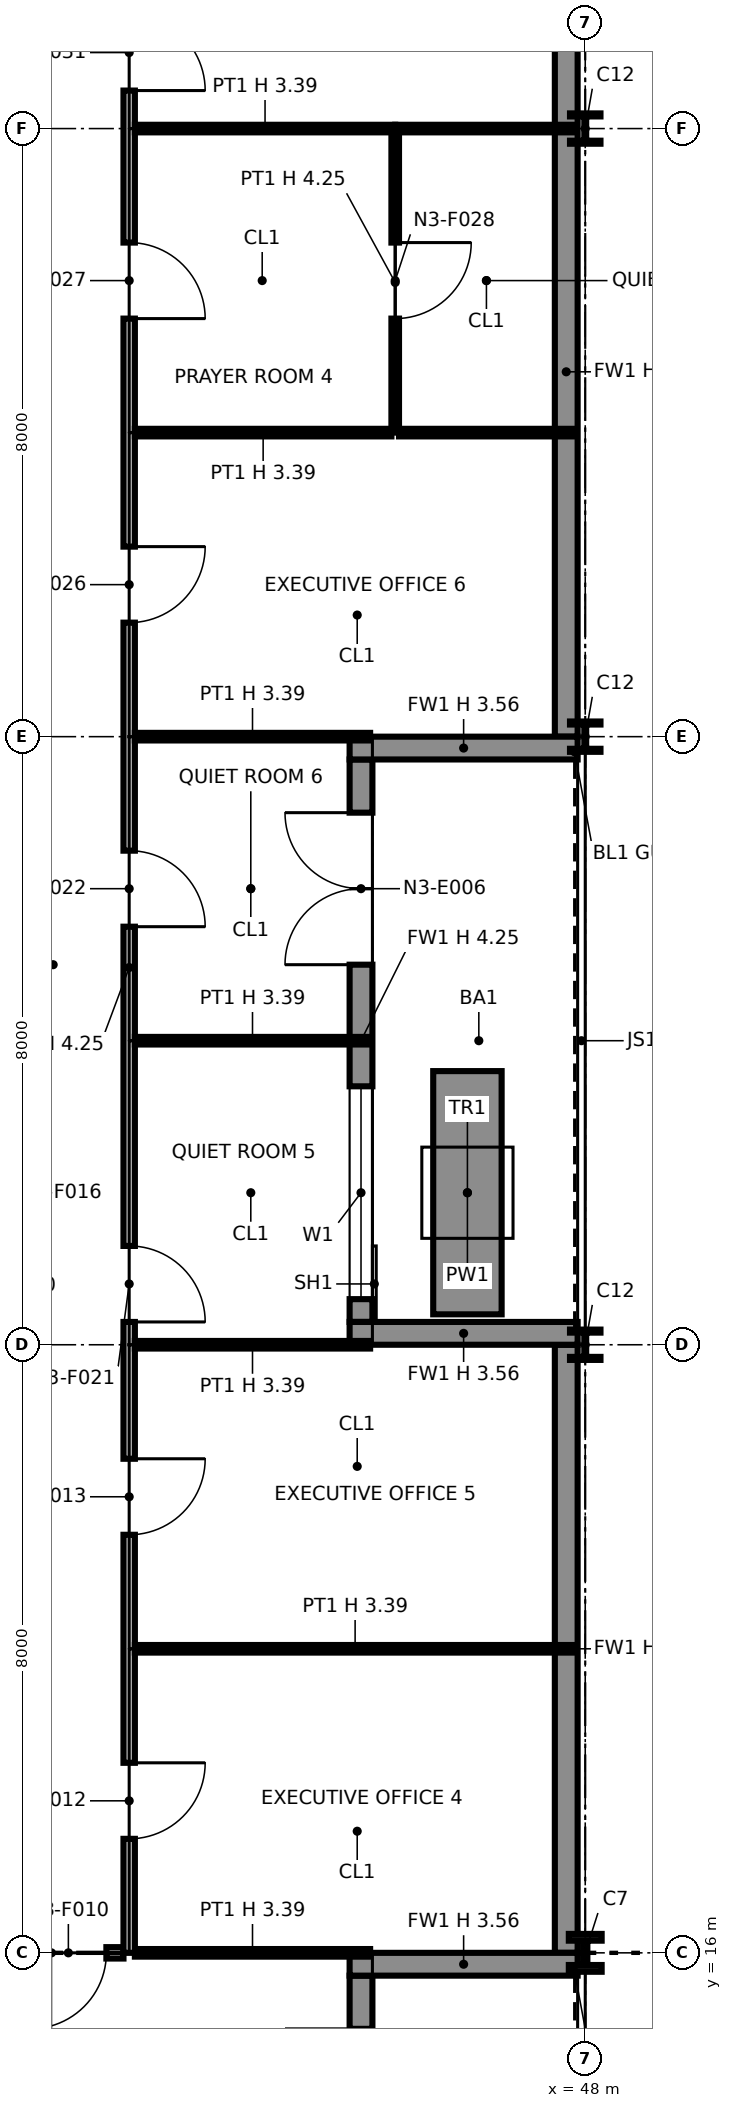
"""IFC4 building model, lengths in metres.
Left out: names, types, materials, properties, quantities, classifications, styles, units other than length and angle.
Written with IfcOpenShell. Run it as: python <this file> out.ifc"""

import sys

from ifc_helpers import new_model, si_unit, direction, frame, frame_2d, origin, origin_2d, place, context, subcontext, project, spatial, polyline, rectangle, i_section, outline, extrude, element, fill, save


model = new_model("IFC4")
c1 = context("Model", 3, precision=1e-05, world=origin(), true_north=direction((0.0, 1.0)))
c2 = subcontext(c1, "Body", "Model", "MODEL_VIEW")
j1 = project(units=[si_unit("LENGTHUNIT", "METRE"), si_unit("PLANEANGLEUNIT", "RADIAN")], contexts=[c1])
p1 = place(None, origin())
s1 = spatial("IfcSite", under=j1, at=p1, CompositionType="ELEMENT")
p2 = place(p1, origin())
s2 = spatial("IfcBuilding", under=s1, at=p2, CompositionType="ELEMENT")
p3 = place(p2, frame((0.0, 0.0, 61.2)))
s3 = spatial("IfcBuildingStorey", under=s2, at=p3, CompositionType="ELEMENT", Elevation=61.2)
p4 = place(p3, frame((48.0, 16.0, 0.0), z_axis=(0.0, 0.0, 1.0), x_axis=(1.0, 0.0, 0.0)))
e1 = element("IfcColumn", 1, at=p4, inside=s3, PredefinedType="COLUMN", context=c2, shape_type="SweptSolid", body=[
    extrude(i_section(OverallWidth=0.432, OverallDepth=0.498, WebThickness=0.056, FlangeThickness=0.089, at=origin_2d()), origin(), (0.0, 0.0, 1.0), 4.25),
])
for number, where, z_axis, x_axis in (
    (2, (48.0, 24.0, 0.0), (0.0, 0.0, 1.0), (1.0, 0.0, 0.0)),
    (3, (48.0, 32.0, 0.0), (0.0, 0.0, 1.0), (1.0, 0.0, 0.0)),
    (4, (48.0, 40.0, 0.0), (0.0, 0.0, 1.0), (1.0, 0.0, 0.0)),
):
    element("IfcColumn", number, at=place(p3, frame(where, z_axis=z_axis, x_axis=x_axis)), inside=s3, PredefinedType="COLUMN", context=c2, shape_type="SweptSolid", body=[
        extrude(i_section(OverallWidth=0.401, OverallDepth=0.399, WebThickness=0.025, FlangeThickness=0.04, at=origin_2d()), origin(), (0.0, 0.0, 1.0), 4.25),
    ])
p5 = place(p3, frame((45.05, 8.3, 0.0), z_axis=(0.0, 0.0, 1.0), x_axis=(0.0, 1.0, 0.0)))
e5 = element("IfcWall", 5, at=p5, inside=s3, PredefinedType="SOLIDWALL", context=c2, shape_type="SweptSolid", body=[
    extrude(rectangle(XDim=7.4, YDim=0.3, at=frame_2d((3.7, 0.0))), origin(), (0.0, 0.0, 1.0), 4.25),
])
p6 = place(p5, frame((0.3, 0.0, 0.9)))
e6 = element("IfcOpeningElement", 6, at=p6, cuts=e5, PredefinedType="OPENING", context=c2, shape_type="SweptSolid", body=[
    extrude(rectangle(XDim=2.8, YDim=2.2, at=frame_2d((1.4, 1.1))), frame((0.0, 0.16, 0.0), z_axis=(0.0, -1.0, 0.0), x_axis=(1.0, 0.0, 0.0)), (0.0, 0.0, 1.0), 0.32),
])
p7 = place(p5, frame((4.7, 0.0, 0.0)))
e7 = element("IfcOpeningElement", 7, at=p7, cuts=e5, PredefinedType="OPENING", context=c2, shape_type="SweptSolid", body=[
    extrude(rectangle(XDim=2.0, YDim=2.4, at=frame_2d((1.0, 1.2))), frame((0.0, 0.16, 0.0), z_axis=(0.0, -1.0, 0.0), x_axis=(1.0, 0.0, 0.0)), (0.0, 0.0, 1.0), 0.32),
])
p8 = place(p3, frame((47.9, 15.85, 0.0), z_axis=(0.0, 0.0, 1.0), x_axis=(-1.0, 0.0, 0.0)))
e8 = element("IfcWall", 8, at=p8, inside=s3, PredefinedType="SOLIDWALL", context=c2, shape_type="SweptSolid", body=[
    extrude(rectangle(XDim=3.0, YDim=0.3, at=frame_2d((1.5, 0.0))), origin(), (0.0, 0.0, 1.0), 3.556),
])
p9 = place(p3, frame((47.75, 16.0, 0.0), z_axis=(0.0, 0.0, 1.0), x_axis=(0.0, 1.0, 0.0)))
e9 = element("IfcWall", 9, at=p9, inside=s3, PredefinedType="SOLIDWALL", context=c2, shape_type="SweptSolid", body=[
    extrude(rectangle(XDim=8.0, YDim=0.3, at=frame_2d((4.0, 0.0))), origin(), (0.0, 0.0, 1.0), 4.25),
])
p10 = place(p3, frame((45.05, 24.3, 0.0), z_axis=(0.0, 0.0, 1.0), x_axis=(0.0, 1.0, 0.0)))
e10 = element("IfcWall", 10, at=p10, inside=s3, PredefinedType="SOLIDWALL", context=c2, shape_type="SweptSolid", body=[
    extrude(rectangle(XDim=7.4, YDim=0.3, at=frame_2d((3.7, 0.0))), origin(), (0.0, 0.0, 1.0), 4.25),
])
p11 = place(p10, frame((0.3, 0.0, 0.9)))
e11 = element("IfcOpeningElement", 11, at=p11, cuts=e10, PredefinedType="OPENING", context=c2, shape_type="SweptSolid", body=[
    extrude(rectangle(XDim=2.8, YDim=2.2, at=frame_2d((1.4, 1.1))), frame((0.0, 0.16, 0.0), z_axis=(0.0, -1.0, 0.0), x_axis=(1.0, 0.0, 0.0)), (0.0, 0.0, 1.0), 0.32),
])
p12 = place(p10, frame((4.7, 0.0, 0.0)))
e12 = element("IfcOpeningElement", 12, at=p12, cuts=e10, PredefinedType="OPENING", context=c2, shape_type="SweptSolid", body=[
    extrude(rectangle(XDim=2.0, YDim=2.4, at=frame_2d((1.0, 1.2))), frame((0.0, 0.16, 0.0), z_axis=(0.0, -1.0, 0.0), x_axis=(1.0, 0.0, 0.0)), (0.0, 0.0, 1.0), 0.32),
])
for number, where, z_axis, x_axis in (
    (13, (47.9, 24.15, 0.0), (0.0, 0.0, 1.0), (-1.0, 0.0, 0.0)),
    (14, (47.9, 31.85, 0.0), (0.0, 0.0, 1.0), (-1.0, 0.0, 0.0)),
):
    element("IfcWall", number, at=place(p3, frame(where, z_axis=z_axis, x_axis=x_axis)), inside=s3, PredefinedType="SOLIDWALL", context=c2, shape_type="SweptSolid", body=[
        extrude(rectangle(XDim=3.0, YDim=0.3, at=frame_2d((1.5, 0.0))), origin(), (0.0, 0.0, 1.0), 3.556),
    ])
p13 = place(p3, frame((47.75, 32.0, 0.0), z_axis=(0.0, 0.0, 1.0), x_axis=(0.0, 1.0, 0.0)))
e15 = element("IfcWall", 15, at=p13, inside=s3, PredefinedType="SOLIDWALL", context=c2, shape_type="SweptSolid", body=[
    extrude(rectangle(XDim=9.6, YDim=0.3, at=frame_2d((4.8, 0.0))), origin(), (0.0, 0.0, 1.0), 4.25),
])
p14 = place(p3, frame((46.45, 24.4, 0.0), z_axis=(0.0, 0.0, 1.0), x_axis=(0.0, 1.0, 0.0)))
e16 = element("IfcWall", 16, at=p14, inside=s3, PredefinedType="SOLIDWALL", context=c2, shape_type="SweptSolid", body=[
    extrude(rectangle(XDim=3.2, YDim=0.9, at=frame_2d((1.6, 0.0))), origin(), (0.0, 0.0, 1.0), 0.6),
])
p15 = place(p3, frame((40.03, 16.0, 0.0), z_axis=(0.0, 0.0, 1.0), x_axis=(1.0, 0.0, 0.0)))
e17 = element("IfcWall", 17, at=p15, inside=s3, PredefinedType="PARTITIONING", context=c2, shape_type="SweptSolid", body=[
    extrude(rectangle(XDim=1.895, YDim=0.15, at=frame_2d((0.948, 0.0))), origin(), (0.0, 0.0, 1.0), 3.391),
])
p16 = place(p15, frame((1.67, 0.0, 0.0), z_axis=(0.0, 0.0, 1.0), x_axis=(-1.0, 0.0, 0.0)))
e18 = element("IfcOpeningElement", 18, at=p16, cuts=e17, PredefinedType="OPENING", context=c2, shape_type="SweptSolid", body=[
    extrude(rectangle(XDim=1.0, YDim=2.1, at=frame_2d((0.5, 1.05))), frame((0.0, 0.085, 0.0), z_axis=(0.0, -1.0, 0.0), x_axis=(1.0, 0.0, 0.0)), (0.0, 0.0, 1.0), 0.17),
])
p17 = place(p3, frame((42.075, 16.0, 0.0), z_axis=(0.0, 0.0, 1.0), x_axis=(1.0, 0.0, 0.0)))
e19 = element("IfcWall", 19, at=p17, inside=s3, PredefinedType="PARTITIONING", context=c2, shape_type="SweptSolid", body=[
    extrude(rectangle(XDim=3.095, YDim=0.1, at=frame_2d((1.547, 0.0))), origin(), (0.0, 0.0, 1.0), 3.391),
])
p18 = place(p3, frame((42.0, 16.0, 0.0), z_axis=(0.0, 0.0, 1.0), x_axis=(0.0, 1.0, 0.0)))
e20 = element("IfcWall", 20, at=p18, inside=s3, PredefinedType="PARTITIONING", context=c2, shape_type="SweptSolid", body=[
    extrude(outline(polyline([(0.0, 0.0), (25.925, 0.0), (25.925, 4.25), (24.3, 4.25), (24.298, 3.391), (23.702, 3.391), (23.7, 4.25), (20.3, 4.25), (20.298, 3.391), (19.702, 3.391), (19.7, 4.25), (16.3, 4.25), (16.298, 3.391), (15.702, 3.391), (15.7, 4.25), (12.3, 4.25), (12.298, 3.391), (11.702, 3.391), (11.7, 4.25), (8.3, 4.25), (8.298, 3.391), (7.702, 3.391), (7.7, 4.25), (4.3, 4.25), (4.298, 3.391), (3.702, 3.391), (3.7, 4.25), (0.0, 4.25), (0.0, 0.0)])), frame((0.0, 0.075, 0.0), z_axis=(0.0, -1.0, 0.0), x_axis=(1.0, 0.0, 0.0)), (0.0, 0.0, 1.0), 0.15),
])
p19 = place(p18, frame((2.5, 0.0, 0.0), z_axis=(0.0, 0.0, 1.0), x_axis=(-1.0, 0.0, 0.0)))
e21 = element("IfcOpeningElement", 21, at=p19, cuts=e20, PredefinedType="OPENING", context=c2, shape_type="SweptSolid", body=[
    extrude(rectangle(XDim=1.0, YDim=2.1, at=frame_2d((0.5, 1.05))), frame((0.0, 0.085, 0.0), z_axis=(0.0, -1.0, 0.0), x_axis=(1.0, 0.0, 0.0)), (0.0, 0.0, 1.0), 0.17),
])
p20 = place(p18, frame((6.5, 0.0, 0.0), z_axis=(0.0, 0.0, 1.0), x_axis=(-1.0, 0.0, 0.0)))
e22 = element("IfcOpeningElement", 22, at=p20, cuts=e20, PredefinedType="OPENING", context=c2, shape_type="SweptSolid", body=[
    extrude(rectangle(XDim=1.0, YDim=2.1, at=frame_2d((0.5, 1.05))), frame((0.0, 0.085, 0.0), z_axis=(0.0, -1.0, 0.0), x_axis=(1.0, 0.0, 0.0)), (0.0, 0.0, 1.0), 0.17),
])
p21 = place(p18, frame((9.3, 0.0, 0.0), z_axis=(0.0, 0.0, 1.0), x_axis=(-1.0, 0.0, 0.0)))
e23 = element("IfcOpeningElement", 23, at=p21, cuts=e20, PredefinedType="OPENING", context=c2, shape_type="SweptSolid", body=[
    extrude(rectangle(XDim=1.0, YDim=2.1, at=frame_2d((0.5, 1.05))), frame((0.0, 0.085, 0.0), z_axis=(0.0, -1.0, 0.0), x_axis=(1.0, 0.0, 0.0)), (0.0, 0.0, 1.0), 0.17),
])
p22 = place(p18, frame((14.5, 0.0, 0.0), z_axis=(0.0, 0.0, 1.0), x_axis=(-1.0, 0.0, 0.0)))
e24 = element("IfcOpeningElement", 24, at=p22, cuts=e20, PredefinedType="OPENING", context=c2, shape_type="SweptSolid", body=[
    extrude(rectangle(XDim=1.0, YDim=2.1, at=frame_2d((0.5, 1.05))), frame((0.0, 0.085, 0.0), z_axis=(0.0, -1.0, 0.0), x_axis=(1.0, 0.0, 0.0)), (0.0, 0.0, 1.0), 0.17),
])
p23 = place(p18, frame((18.5, 0.0, 0.0), z_axis=(0.0, 0.0, 1.0), x_axis=(-1.0, 0.0, 0.0)))
e25 = element("IfcOpeningElement", 25, at=p23, cuts=e20, PredefinedType="OPENING", context=c2, shape_type="SweptSolid", body=[
    extrude(rectangle(XDim=1.0, YDim=2.1, at=frame_2d((0.5, 1.05))), frame((0.0, 0.085, 0.0), z_axis=(0.0, -1.0, 0.0), x_axis=(1.0, 0.0, 0.0)), (0.0, 0.0, 1.0), 0.17),
])
p24 = place(p18, frame((22.5, 0.0, 0.0), z_axis=(0.0, 0.0, 1.0), x_axis=(-1.0, 0.0, 0.0)))
e26 = element("IfcOpeningElement", 26, at=p24, cuts=e20, PredefinedType="OPENING", context=c2, shape_type="SweptSolid", body=[
    extrude(rectangle(XDim=1.0, YDim=2.1, at=frame_2d((0.5, 1.05))), frame((0.0, 0.085, 0.0), z_axis=(0.0, -1.0, 0.0), x_axis=(1.0, 0.0, 0.0)), (0.0, 0.0, 1.0), 0.17),
])
p25 = place(p18, frame((25.5, 0.0, 0.0), z_axis=(0.0, 0.0, 1.0), x_axis=(-1.0, 0.0, 0.0)))
e27 = element("IfcOpeningElement", 27, at=p25, cuts=e20, PredefinedType="OPENING", context=c2, shape_type="SweptSolid", body=[
    extrude(rectangle(XDim=1.0, YDim=2.1, at=frame_2d((0.5, 1.05))), frame((0.0, 0.085, 0.0), z_axis=(0.0, -1.0, 0.0), x_axis=(1.0, 0.0, 0.0)), (0.0, 0.0, 1.0), 0.17),
])
p26 = place(p3, frame((42.075, 20.0, 0.0), z_axis=(0.0, 0.0, 1.0), x_axis=(1.0, 0.0, 0.0)))
e28 = element("IfcWall", 28, at=p26, inside=s3, PredefinedType="PARTITIONING", context=c2, shape_type="SweptSolid", body=[
    extrude(rectangle(XDim=5.795, YDim=0.1, at=frame_2d((2.897, 0.0))), origin(), (0.0, 0.0, 1.0), 3.391),
])
for number, where, z_axis, x_axis in (
    (29, (42.075, 24.0, 0.0), (0.0, 0.0, 1.0), (1.0, 0.0, 0.0)),
    (30, (42.075, 28.0, 0.0), (0.0, 0.0, 1.0), (1.0, 0.0, 0.0)),
    (31, (42.075, 32.0, 0.0), (0.0, 0.0, 1.0), (1.0, 0.0, 0.0)),
):
    element("IfcWall", number, at=place(p3, frame(where, z_axis=z_axis, x_axis=x_axis)), inside=s3, PredefinedType="PARTITIONING", context=c2, shape_type="SweptSolid", body=[
        extrude(rectangle(XDim=3.095, YDim=0.1, at=frame_2d((1.547, 0.0))), origin(), (0.0, 0.0, 1.0), 3.391),
    ])
p27 = place(p3, frame((42.075, 36.0, 0.0), z_axis=(0.0, 0.0, 1.0), x_axis=(1.0, 0.0, 0.0)))
e32 = element("IfcWall", 32, at=p27, inside=s3, PredefinedType="PARTITIONING", context=c2, shape_type="SweptSolid", body=[
    extrude(rectangle(XDim=3.375, YDim=0.1, at=frame_2d((1.688, 0.0))), origin(), (0.0, 0.0, 1.0), 3.391),
])
p28 = place(p3, frame((45.55, 36.0, 0.0), z_axis=(0.0, 0.0, 1.0), x_axis=(1.0, 0.0, 0.0)))
e33 = element("IfcWall", 33, at=p28, inside=s3, PredefinedType="PARTITIONING", context=c2, shape_type="SweptSolid", body=[
    extrude(rectangle(XDim=2.32, YDim=0.1, at=frame_2d((1.16, 0.0))), origin(), (0.0, 0.0, 1.0), 3.391),
])
p29 = place(p3, frame((45.5, 36.0, 0.0), z_axis=(0.0, 0.0, 1.0), x_axis=(0.0, 1.0, 0.0)))
e34 = element("IfcWall", 34, at=p29, inside=s3, PredefinedType="PARTITIONING", context=c2, shape_type="SweptSolid", body=[
    extrude(rectangle(XDim=3.95, YDim=0.1, at=frame_2d((1.975, 0.0))), origin(), (0.0, 0.0, 1.0), 4.25),
])
p30 = place(p29, frame((2.5, 0.0, 0.0), z_axis=(0.0, 0.0, 1.0), x_axis=(-1.0, 0.0, 0.0)))
e35 = element("IfcOpeningElement", 35, at=p30, cuts=e34, PredefinedType="OPENING", context=c2, shape_type="SweptSolid", body=[
    extrude(rectangle(XDim=1.0, YDim=2.1, at=frame_2d((0.5, 1.05))), frame((0.0, 0.06, 0.0), z_axis=(0.0, -1.0, 0.0), x_axis=(1.0, 0.0, 0.0)), (0.0, 0.0, 1.0), 0.12),
])
p31 = place(p3, frame((42.075, 40.0, 0.0), z_axis=(0.0, 0.0, 1.0), x_axis=(1.0, 0.0, 0.0)))
e36 = element("IfcWall", 36, at=p31, inside=s3, PredefinedType="PARTITIONING", context=c2, shape_type="SweptSolid", body=[
    extrude(rectangle(XDim=3.425, YDim=0.1, at=frame_2d((1.712, 0.0))), origin(), (0.0, 0.0, 1.0), 3.391),
])
p32 = place(p3, frame((45.5, 40.0, 0.0), z_axis=(0.0, 0.0, 1.0), x_axis=(1.0, 0.0, 0.0)))
e37 = element("IfcWall", 37, at=p32, inside=s3, PredefinedType="PARTITIONING", context=c2, shape_type="SweptSolid", body=[
    extrude(rectangle(XDim=2.37, YDim=0.1, at=frame_2d((1.185, 0.0))), origin(), (0.0, 0.0, 1.0), 3.391),
])
p33 = place(p11, origin())
e38 = element("IfcWindow", 38, at=p33, inside=s3, PartitioningType="SINGLE_PANEL", PredefinedType="WINDOW", context=c2, shape_type="SweptSolid", body=[
    extrude(rectangle(XDim=2.8, YDim=2.2, at=frame_2d((1.4, 1.1))), frame((0.0, 0.03, 0.0), z_axis=(0.0, -1.0, 0.0), x_axis=(1.0, 0.0, 0.0)), (0.0, 0.0, 1.0), 0.06),
])
fill(e11, e38)
p34 = place(p12, origin())
e39 = element("IfcDoor", 39, at=p34, inside=s3, OperationType="DOUBLE_DOOR_SINGLE_SWING", PredefinedType="DOOR", context=c2, shape_type="SweptSolid", body=[
    extrude(rectangle(XDim=2.0, YDim=2.4, at=frame_2d((1.0, 1.2))), frame((0.0, 0.025, 0.0), z_axis=(0.0, -1.0, 0.0), x_axis=(1.0, 0.0, 0.0)), (0.0, 0.0, 1.0), 0.05),
])
fill(e12, e39)
p35 = place(p16, origin())
e40 = element("IfcDoor", 40, at=p35, inside=s3, OperationType="SINGLE_SWING_RIGHT", PredefinedType="DOOR", context=c2, shape_type="SweptSolid", body=[
    extrude(rectangle(XDim=1.0, YDim=2.1, at=frame_2d((0.5, 1.05))), frame((0.0, 0.025, 0.0), z_axis=(0.0, -1.0, 0.0), x_axis=(1.0, 0.0, 0.0)), (0.0, 0.0, 1.0), 0.05),
])
fill(e18, e40)
p36 = place(p19, origin())
e41 = element("IfcDoor", 41, at=p36, inside=s3, OperationType="SINGLE_SWING_LEFT", PredefinedType="DOOR", context=c2, shape_type="SweptSolid", body=[
    extrude(rectangle(XDim=1.0, YDim=2.1, at=frame_2d((0.5, 1.05))), frame((0.0, 0.025, 0.0), z_axis=(0.0, -1.0, 0.0), x_axis=(1.0, 0.0, 0.0)), (0.0, 0.0, 1.0), 0.05),
])
fill(e21, e41)
p37 = place(p20, origin())
e42 = element("IfcDoor", 42, at=p37, inside=s3, OperationType="SINGLE_SWING_LEFT", PredefinedType="DOOR", context=c2, shape_type="SweptSolid", body=[
    extrude(rectangle(XDim=1.0, YDim=2.1, at=frame_2d((0.5, 1.05))), frame((0.0, 0.025, 0.0), z_axis=(0.0, -1.0, 0.0), x_axis=(1.0, 0.0, 0.0)), (0.0, 0.0, 1.0), 0.05),
])
fill(e22, e42)
p38 = place(p21, origin())
e43 = element("IfcDoor", 43, at=p38, inside=s3, OperationType="SINGLE_SWING_RIGHT", PredefinedType="DOOR", context=c2, shape_type="SweptSolid", body=[
    extrude(rectangle(XDim=1.0, YDim=2.1, at=frame_2d((0.5, 1.05))), frame((0.0, 0.025, 0.0), z_axis=(0.0, -1.0, 0.0), x_axis=(1.0, 0.0, 0.0)), (0.0, 0.0, 1.0), 0.05),
])
fill(e23, e43)
p39 = place(p22, origin())
e44 = element("IfcDoor", 44, at=p39, inside=s3, OperationType="SINGLE_SWING_RIGHT", PredefinedType="DOOR", context=c2, shape_type="SweptSolid", body=[
    extrude(rectangle(XDim=1.0, YDim=2.1, at=frame_2d((0.5, 1.05))), frame((0.0, 0.025, 0.0), z_axis=(0.0, -1.0, 0.0), x_axis=(1.0, 0.0, 0.0)), (0.0, 0.0, 1.0), 0.05),
])
fill(e24, e44)
p40 = place(p23, origin())
e45 = element("IfcDoor", 45, at=p40, inside=s3, OperationType="SINGLE_SWING_LEFT", PredefinedType="DOOR", context=c2, shape_type="SweptSolid", body=[
    extrude(rectangle(XDim=1.0, YDim=2.1, at=frame_2d((0.5, 1.05))), frame((0.0, 0.025, 0.0), z_axis=(0.0, -1.0, 0.0), x_axis=(1.0, 0.0, 0.0)), (0.0, 0.0, 1.0), 0.05),
])
fill(e25, e45)
p41 = place(p24, origin())
e46 = element("IfcDoor", 46, at=p41, inside=s3, OperationType="SINGLE_SWING_RIGHT", PredefinedType="DOOR", context=c2, shape_type="SweptSolid", body=[
    extrude(rectangle(XDim=1.0, YDim=2.1, at=frame_2d((0.5, 1.05))), frame((0.0, 0.025, 0.0), z_axis=(0.0, -1.0, 0.0), x_axis=(1.0, 0.0, 0.0)), (0.0, 0.0, 1.0), 0.05),
])
fill(e26, e46)
p42 = place(p30, origin())
e47 = element("IfcDoor", 47, at=p42, inside=s3, OperationType="SINGLE_SWING_LEFT", PredefinedType="DOOR", context=c2, shape_type="SweptSolid", body=[
    extrude(rectangle(XDim=1.0, YDim=2.1, at=frame_2d((0.5, 1.05))), frame((0.0, 0.025, 0.0), z_axis=(0.0, -1.0, 0.0), x_axis=(1.0, 0.0, 0.0)), (0.0, 0.0, 1.0), 0.05),
])
fill(e35, e47)
p43 = place(p25, origin())
e48 = element("IfcDoor", 48, at=p43, inside=s3, OperationType="SINGLE_SWING_RIGHT", PredefinedType="DOOR", context=c2, shape_type="SweptSolid", body=[
    extrude(rectangle(XDim=1.0, YDim=2.1, at=frame_2d((0.5, 1.05))), frame((0.0, 0.025, 0.0), z_axis=(0.0, -1.0, 0.0), x_axis=(1.0, 0.0, 0.0)), (0.0, 0.0, 1.0), 0.05),
])
fill(e27, e48)
save(model, sys.argv[1])
